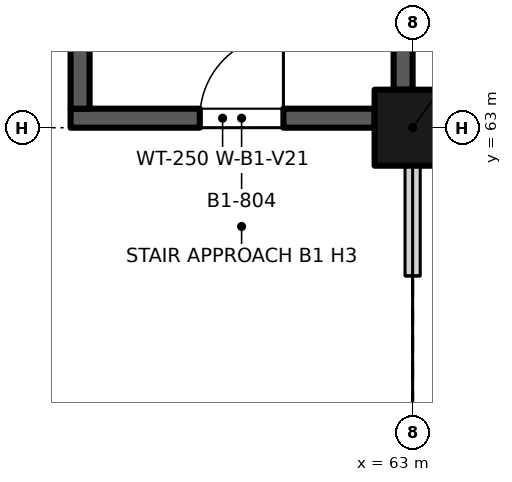
"""IFC4 building model, lengths in metres.
Left out: names, types, materials, properties, quantities, classifications, styles, units other than length and angle.
Written with IfcOpenShell. Run it as: python <this file> out.ifc"""

import sys

from ifc_helpers import new_model, si_unit, direction, frame, frame_2d, origin, origin_2d, place, context, subcontext, project, spatial, rectangle, extrude, element, fill, save


model = new_model("IFC4")
c1 = context("Model", 3, precision=1e-05, world=origin(), true_north=direction((0.0, 1.0)))
c2 = subcontext(c1, "Body", "Model", "MODEL_VIEW")
j1 = project(units=[si_unit("LENGTHUNIT", "METRE"), si_unit("PLANEANGLEUNIT", "RADIAN")], contexts=[c1])
p1 = place(None, origin())
s1 = spatial("IfcSite", under=j1, at=p1, CompositionType="ELEMENT")
p2 = place(p1, origin())
s2 = spatial("IfcBuilding", under=s1, at=p2, CompositionType="ELEMENT")
p3 = place(p2, frame((0.0, 0.0, -5.1)))
s3 = spatial("IfcBuildingStorey", under=s2, at=p3, CompositionType="ELEMENT", Elevation=-5.1)
p4 = place(p3, frame((63.0, 63.0, 0.0), z_axis=(0.0, 0.0, 1.0), x_axis=(1.0, 0.0, 0.0)))
e1 = element("IfcColumn", 1, at=p4, inside=s3, PredefinedType="COLUMN", context=c2, shape_type="SweptSolid", body=[
    extrude(rectangle(XDim=1.0, YDim=1.0, at=origin_2d()), origin(), (0.0, 0.0, 1.0), 5.1),
])
p5 = place(p3, frame((58.5, 63.125, 0.0), z_axis=(0.0, 0.0, 1.0), x_axis=(1.0, 0.0, 0.0)))
e2 = element("IfcWall", 2, at=p5, inside=s3, PredefinedType="SHEAR", context=c2, shape_type="SweptSolid", body=[
    extrude(rectangle(XDim=4.0, YDim=0.25, at=frame_2d((2.0, 0.0))), origin(), (0.0, 0.0, 1.0), 5.1),
])
p6 = place(p5, frame((1.7, 0.0, 0.0)))
e3 = element("IfcOpeningElement", 3, at=p6, cuts=e2, PredefinedType="OPENING", context=c2, shape_type="SweptSolid", body=[
    extrude(rectangle(XDim=1.1, YDim=2.1, at=frame_2d((0.55, 1.05))), frame((0.0, 0.135, 0.0), z_axis=(0.0, -1.0, 0.0), x_axis=(1.0, 0.0, 0.0)), (0.0, 0.0, 1.0), 0.27),
])
p7 = place(p3, frame((58.625, 63.25, 0.0), z_axis=(0.0, 0.0, 1.0), x_axis=(0.0, 1.0, 0.0)))
e4 = element("IfcWall", 4, at=p7, inside=s3, PredefinedType="SHEAR", context=c2, shape_type="SweptSolid", body=[
    extrude(rectangle(XDim=8.5, YDim=0.25, at=frame_2d((4.25, 0.0))), origin(), (0.0, 0.0, 1.0), 5.1),
])
p8 = place(p3, frame((62.875, 63.5, 0.0), z_axis=(0.0, 0.0, 1.0), x_axis=(0.0, 1.0, 0.0)))
e5 = element("IfcWall", 5, at=p8, inside=s3, PredefinedType="SHEAR", context=c2, shape_type="SweptSolid", body=[
    extrude(rectangle(XDim=8.0, YDim=0.25, at=frame_2d((4.0, 0.0))), origin(), (0.0, 0.0, 1.0), 5.1),
])
p9 = place(p3, frame((63.0, 54.5, 0.0), z_axis=(0.0, 0.0, 1.0), x_axis=(0.0, 1.0, 0.0)))
e6 = element("IfcWall", 6, at=p9, inside=s3, PredefinedType="PARTITIONING", context=c2, shape_type="SweptSolid", body=[
    extrude(rectangle(XDim=8.0, YDim=0.2, at=frame_2d((4.0, 0.0))), origin(), (0.0, 0.0, 1.0), 4.3),
])
p10 = place(p9, frame((1.55, 0.0, 0.0)))
e7 = element("IfcOpeningElement", 7, at=p10, cuts=e6, PredefinedType="OPENING", context=c2, shape_type="SweptSolid", body=[
    extrude(rectangle(XDim=5.0, YDim=2.4, at=frame_2d((2.5, 1.2))), frame((0.0, 0.11, 0.0), z_axis=(0.0, -1.0, 0.0), x_axis=(1.0, 0.0, 0.0)), (0.0, 0.0, 1.0), 0.22),
])
p11 = place(p6, origin())
e8 = element("IfcDoor", 8, at=p11, inside=s3, OperationType="SINGLE_SWING_RIGHT", PredefinedType="DOOR", context=c2, shape_type="SweptSolid", body=[
    extrude(rectangle(XDim=1.1, YDim=2.1, at=frame_2d((0.55, 1.05))), frame((0.0, 0.025, 0.0), z_axis=(0.0, -1.0, 0.0), x_axis=(1.0, 0.0, 0.0)), (0.0, 0.0, 1.0), 0.05),
])
fill(e3, e8)
p12 = place(p10, origin())
e9 = element("IfcDoor", 9, at=p12, inside=s3, OperationType="SINGLE_SWING_LEFT", PredefinedType="DOOR", context=c2, shape_type="SweptSolid", body=[
    extrude(rectangle(XDim=5.0, YDim=2.4, at=frame_2d((2.5, 1.2))), frame((0.0, 0.025, 0.0), z_axis=(0.0, -1.0, 0.0), x_axis=(1.0, 0.0, 0.0)), (0.0, 0.0, 1.0), 0.05),
])
fill(e7, e9)
save(model, sys.argv[1])
